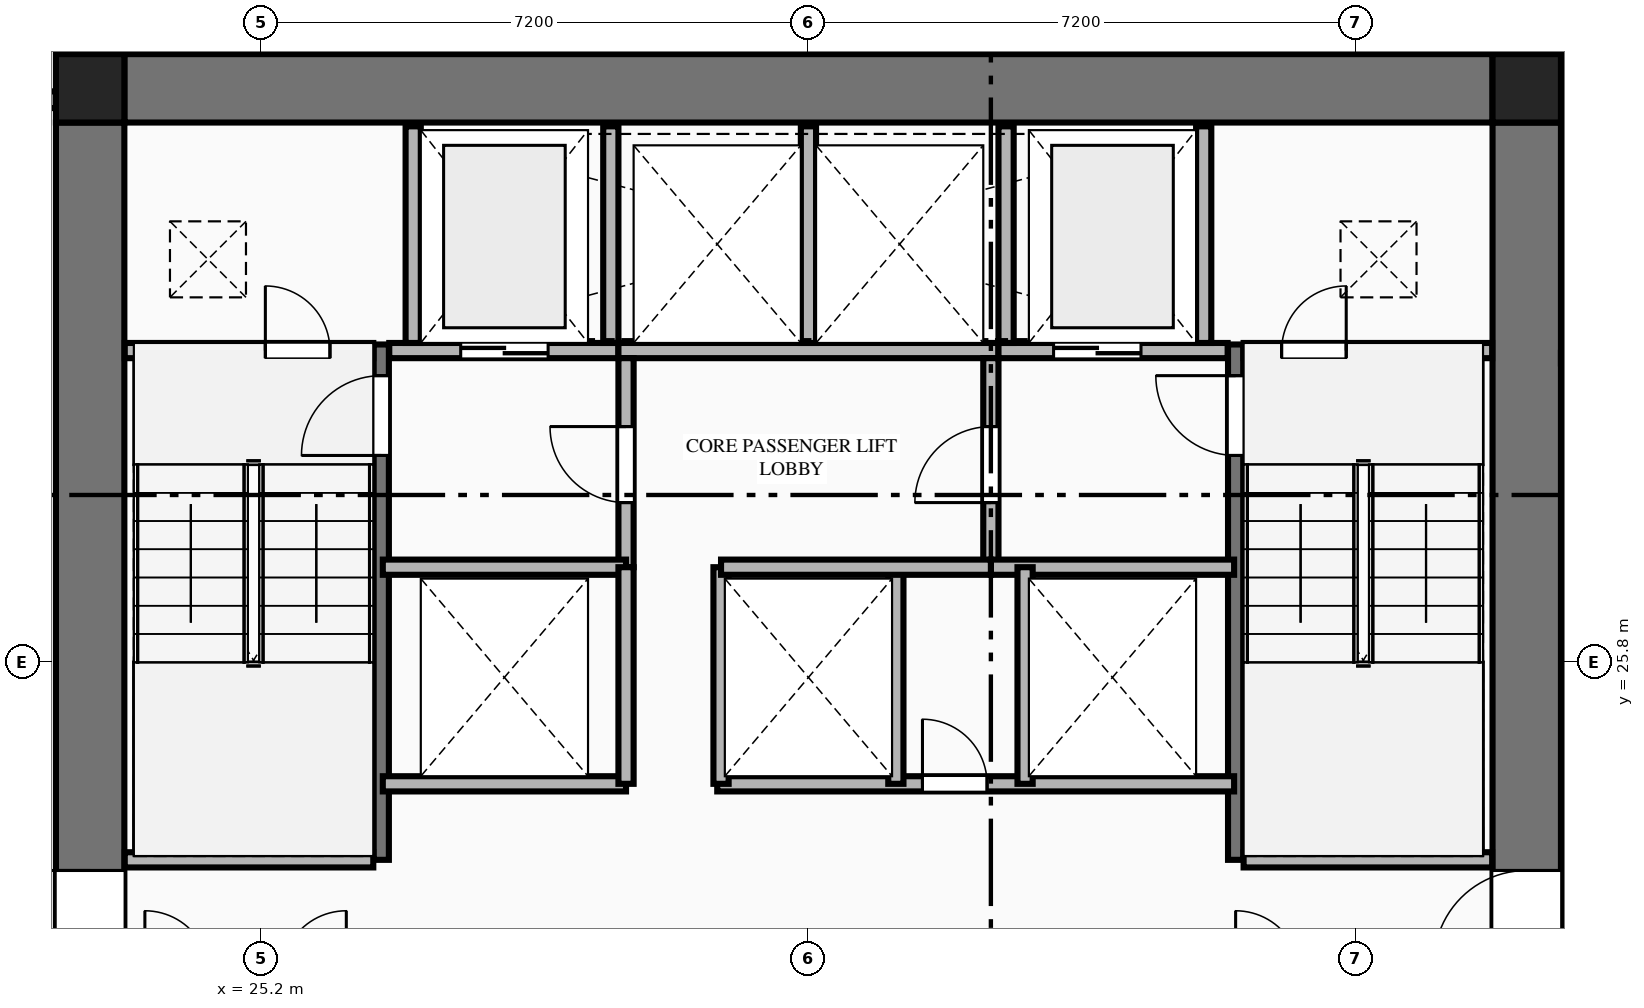
"""IFC4 building model, lengths in metres.
Left out: names, types, materials, properties, quantities, classifications, styles, units other than length and angle.
Written with IfcOpenShell. Run it as: python <this file> out.ifc"""

import sys

from ifc_helpers import new_model, si_unit, direction, frame, frame_2d, origin, origin_2d, place, context, subcontext, project, spatial, rectangle, extrude, element, fill, save


model = new_model("IFC4")
c1 = context("Model", 3, precision=1e-05, world=origin(), true_north=direction((0.0, 1.0)))
c2 = subcontext(c1, "Body", "Model", "MODEL_VIEW")
j1 = project(units=[si_unit("LENGTHUNIT", "METRE"), si_unit("PLANEANGLEUNIT", "RADIAN")], contexts=[c1])
p1 = place(None, origin())
s1 = spatial("IfcSite", under=j1, at=p1, CompositionType="ELEMENT")
p2 = place(p1, origin())
s2 = spatial("IfcBuilding", under=s1, at=p2, CompositionType="ELEMENT")
p3 = place(p2, frame((0.0, 0.0, 19.5)))
s3 = spatial("IfcBuildingStorey", under=s2, at=p3, CompositionType="ELEMENT", Elevation=19.5)
for number, where, z_axis, x_axis in (
    (1, (41.85, 33.35, 0.0), (0.0, 0.0, 1.0), (1.0, 0.0, 0.0)),
    (2, (22.95, 33.35, 0.0), (0.0, 0.0, 1.0), (1.0, 0.0, 0.0)),
):
    element("IfcColumn", number, at=place(p3, frame(where, z_axis=z_axis, x_axis=x_axis)), inside=s3, PredefinedType="COLUMN", context=c2, shape_type="SweptSolid", body=[
        extrude(rectangle(XDim=0.9, YDim=0.9, at=origin_2d()), origin(), (0.0, 0.0, 1.0), 5.4),
    ])
p4 = place(p3, frame((23.4, 33.35, 0.0), z_axis=(0.0, 0.0, 1.0), x_axis=(1.0, 0.0, 0.0)))
e3 = element("IfcWall", 3, at=p4, inside=s3, PredefinedType="SHEAR", context=c2, shape_type="SweptSolid", body=[
    extrude(rectangle(XDim=18.0, YDim=0.9, at=frame_2d((9.0, 0.0))), origin(), (0.0, 0.0, 1.0), 5.18),
])
p5 = place(p3, frame((22.95, 18.9, 0.0), z_axis=(0.0, 0.0, 1.0), x_axis=(0.0, 1.0, 0.0)))
e4 = element("IfcWall", 4, at=p5, inside=s3, PredefinedType="SHEAR", context=c2, shape_type="SweptSolid", body=[
    extrude(rectangle(XDim=14.0, YDim=0.9, at=frame_2d((7.0, 0.0))), origin(), (0.0, 0.0, 1.0), 5.18),
])
p6 = place(p5, frame((2.94, 0.0, 0.0)))
e5 = element("IfcOpeningElement", 5, at=p6, cuts=e4, PredefinedType="OPENING", context=c2, shape_type="SweptSolid", body=[
    extrude(rectangle(XDim=1.22, YDim=2.25, at=frame_2d((0.61, 1.125))), frame((0.0, 0.46, 0.0), z_axis=(0.0, -1.0, 0.0), x_axis=(1.0, 0.0, 0.0)), (0.0, 0.0, 1.0), 0.92),
])
p7 = place(p3, frame((41.85, 18.9, 0.0), z_axis=(0.0, 0.0, 1.0), x_axis=(0.0, 1.0, 0.0)))
e6 = element("IfcWall", 6, at=p7, inside=s3, PredefinedType="SHEAR", context=c2, shape_type="SweptSolid", body=[
    extrude(rectangle(XDim=14.0, YDim=0.9, at=frame_2d((7.0, 0.0))), origin(), (0.0, 0.0, 1.0), 5.18),
])
p8 = place(p7, frame((2.94, 0.0, 0.0)))
e7 = element("IfcOpeningElement", 7, at=p8, cuts=e6, PredefinedType="OPENING", context=c2, shape_type="SweptSolid", body=[
    extrude(rectangle(XDim=1.22, YDim=2.25, at=frame_2d((0.61, 1.125))), frame((0.0, 0.46, 0.0), z_axis=(0.0, -1.0, 0.0), x_axis=(1.0, 0.0, 0.0)), (0.0, 0.0, 1.0), 0.92),
])
p9 = place(p3, frame((26.78, 23.2, 0.0), z_axis=(0.0, 0.0, 1.0), x_axis=(0.0, 1.0, 0.0)))
e8 = element("IfcWall", 8, at=p9, inside=s3, PredefinedType="SHEAR", context=c2, shape_type="SweptSolid", body=[
    extrude(rectangle(XDim=6.78, YDim=0.2, at=frame_2d((3.39, 0.0))), origin(), (0.0, 0.0, 1.0), 5.4),
])
p10 = place(p9, frame((5.32, 0.0, 0.0)))
e9 = element("IfcOpeningElement", 9, at=p10, cuts=e8, PredefinedType="OPENING", context=c2, shape_type="SweptSolid", body=[
    extrude(rectangle(XDim=1.05, YDim=2.15, at=frame_2d((0.525, 1.075))), frame((0.0, 0.11, 0.0), z_axis=(0.0, -1.0, 0.0), x_axis=(1.0, 0.0, 0.0)), (0.0, 0.0, 1.0), 0.22),
])
p11 = place(p3, frame((23.405, 23.2, 0.0), z_axis=(0.0, 0.0, 1.0), x_axis=(1.0, 0.0, 0.0)))
e10 = element("IfcWall", 10, at=p11, inside=s3, PredefinedType="PLUMBINGWALL", context=c2, shape_type="SweptSolid", body=[
    extrude(rectangle(XDim=3.27, YDim=0.2, at=frame_2d((1.635, 0.0))), origin(), (0.0, 0.0, 1.0), 5.18),
])
p12 = place(p3, frame((38.02, 23.2, 0.0), z_axis=(0.0, 0.0, 1.0), x_axis=(0.0, 1.0, 0.0)))
e11 = element("IfcWall", 11, at=p12, inside=s3, PredefinedType="SHEAR", context=c2, shape_type="SweptSolid", body=[
    extrude(rectangle(XDim=6.78, YDim=0.2, at=frame_2d((3.39, 0.0))), origin(), (0.0, 0.0, 1.0), 5.4),
])
p13 = place(p12, frame((5.32, 0.0, 0.0)))
e12 = element("IfcOpeningElement", 12, at=p13, cuts=e11, PredefinedType="OPENING", context=c2, shape_type="SweptSolid", body=[
    extrude(rectangle(XDim=1.05, YDim=2.15, at=frame_2d((0.525, 1.075))), frame((0.0, 0.11, 0.0), z_axis=(0.0, -1.0, 0.0), x_axis=(1.0, 0.0, 0.0)), (0.0, 0.0, 1.0), 0.22),
])
p14 = place(p3, frame((38.125, 23.2, 0.0), z_axis=(0.0, 0.0, 1.0), x_axis=(1.0, 0.0, 0.0)))
e13 = element("IfcWall", 13, at=p14, inside=s3, PredefinedType="PLUMBINGWALL", context=c2, shape_type="SweptSolid", body=[
    extrude(rectangle(XDim=3.27, YDim=0.2, at=frame_2d((1.635, 0.0))), origin(), (0.0, 0.0, 1.0), 5.18),
])
p15 = place(p3, frame((23.405, 29.9, 0.0), z_axis=(0.0, 0.0, 1.0), x_axis=(1.0, 0.0, 0.0)))
e14 = element("IfcWall", 14, at=p15, inside=s3, PredefinedType="PLUMBINGWALL", context=c2, shape_type="SweptSolid", body=[
    extrude(rectangle(XDim=3.27, YDim=0.2, at=frame_2d((1.635, 0.0))), origin(), (0.0, 0.0, 1.0), 5.18),
])
p16 = place(p15, frame((1.85, 0.0, 0.0)))
e15 = element("IfcOpeningElement", 15, at=p16, cuts=e14, PredefinedType="OPENING", context=c2, shape_type="SweptSolid", body=[
    extrude(rectangle(XDim=0.85, YDim=2.05, at=frame_2d((0.425, 1.025))), frame((0.0, 0.11, 0.0), z_axis=(0.0, -1.0, 0.0), x_axis=(1.0, 0.0, 0.0)), (0.0, 0.0, 1.0), 0.22),
])
p17 = place(p3, frame((26.885, 29.9, 0.0), z_axis=(0.0, 0.0, 1.0), x_axis=(1.0, 0.0, 0.0)))
e16 = element("IfcWall", 16, at=p17, inside=s3, PredefinedType="PLUMBINGWALL", context=c2, shape_type="SweptSolid", body=[
    extrude(rectangle(XDim=3.015, YDim=0.2, at=frame_2d((1.507, 0.0))), origin(), (0.0, 0.0, 1.0), 5.18),
])
p18 = place(p17, frame((0.94, 0.0, 0.0)))
e17 = element("IfcOpeningElement", 17, at=p18, cuts=e16, PredefinedType="OPENING", context=c2, shape_type="SweptSolid", body=[
    extrude(rectangle(XDim=1.15, YDim=2.2, at=frame_2d((0.575, 1.1))), frame((0.0, 0.11, 0.0), z_axis=(0.0, -1.0, 0.0), x_axis=(1.0, 0.0, 0.0)), (0.0, 0.0, 1.0), 0.22),
])
p19 = place(p3, frame((29.9, 29.9, 0.0), z_axis=(0.0, 0.0, 1.0), x_axis=(1.0, 0.0, 0.0)))
e18 = element("IfcWall", 18, at=p19, inside=s3, PredefinedType="PLUMBINGWALL", context=c2, shape_type="SweptSolid", body=[
    extrude(rectangle(XDim=5.0, YDim=0.2, at=frame_2d((2.5, 0.0))), origin(), (0.0, 0.0, 1.0), 5.18),
])
p20 = place(p3, frame((34.9, 29.9, 0.0), z_axis=(0.0, 0.0, 1.0), x_axis=(1.0, 0.0, 0.0)))
e19 = element("IfcWall", 19, at=p20, inside=s3, PredefinedType="PLUMBINGWALL", context=c2, shape_type="SweptSolid", body=[
    extrude(rectangle(XDim=3.015, YDim=0.2, at=frame_2d((1.508, 0.0))), origin(), (0.0, 0.0, 1.0), 5.18),
])
p21 = place(p20, frame((0.725, 0.0, 0.0)))
e20 = element("IfcOpeningElement", 20, at=p21, cuts=e19, PredefinedType="OPENING", context=c2, shape_type="SweptSolid", body=[
    extrude(rectangle(XDim=1.15, YDim=2.2, at=frame_2d((0.575, 1.1))), frame((0.0, 0.11, 0.0), z_axis=(0.0, -1.0, 0.0), x_axis=(1.0, 0.0, 0.0)), (0.0, 0.0, 1.0), 0.22),
])
p22 = place(p3, frame((38.125, 29.9, 0.0), z_axis=(0.0, 0.0, 1.0), x_axis=(1.0, 0.0, 0.0)))
e21 = element("IfcWall", 21, at=p22, inside=s3, PredefinedType="PLUMBINGWALL", context=c2, shape_type="SweptSolid", body=[
    extrude(rectangle(XDim=3.27, YDim=0.2, at=frame_2d((1.635, 0.0))), origin(), (0.0, 0.0, 1.0), 5.18),
])
p23 = place(p22, frame((0.5, 0.0, 0.0)))
e22 = element("IfcOpeningElement", 22, at=p23, cuts=e21, PredefinedType="OPENING", context=c2, shape_type="SweptSolid", body=[
    extrude(rectangle(XDim=0.85, YDim=2.05, at=frame_2d((0.425, 1.025))), frame((0.0, 0.11, 0.0), z_axis=(0.0, -1.0, 0.0), x_axis=(1.0, 0.0, 0.0)), (0.0, 0.0, 1.0), 0.22),
])
for number, where, z_axis, x_axis in (
    (23, (27.2, 30.0, 0.0), (0.0, 0.0, 1.0), (0.0, 1.0, 0.0)),
    (24, (29.8, 30.0, 0.0), (0.0, 0.0, 1.0), (0.0, 1.0, 0.0)),
    (25, (32.4, 30.0, 0.0), (0.0, 0.0, 1.0), (0.0, 1.0, 0.0)),
    (26, (35.0, 30.0, 0.0), (0.0, 0.0, 1.0), (0.0, 1.0, 0.0)),
    (27, (37.6, 30.0, 0.0), (0.0, 0.0, 1.0), (0.0, 1.0, 0.0)),
):
    element("IfcWall", number, at=place(p3, frame(where, z_axis=z_axis, x_axis=x_axis)), inside=s3, PredefinedType="PLUMBINGWALL", context=c2, shape_type="SweptSolid", body=[
        extrude(rectangle(XDim=2.85, YDim=0.2, at=frame_2d((1.425, 0.0))), origin(), (0.0, 0.0, 1.0), 5.18),
    ])
p24 = place(p3, frame((30.0, 27.05, 0.0), z_axis=(0.0, 0.0, 1.0), x_axis=(0.0, 1.0, 0.0)))
e28 = element("IfcWall", 28, at=p24, inside=s3, PredefinedType="PLUMBINGWALL", context=c2, shape_type="SweptSolid", body=[
    extrude(rectangle(XDim=2.75, YDim=0.2, at=frame_2d((1.375, 0.0))), origin(), (0.0, 0.0, 1.0), 5.18),
])
p25 = place(p24, frame((0.85, 0.0, 0.0)))
e29 = element("IfcOpeningElement", 29, at=p25, cuts=e28, PredefinedType="OPENING", context=c2, shape_type="SweptSolid", body=[
    extrude(rectangle(XDim=1.0, YDim=2.15, at=frame_2d((0.5, 1.075))), frame((0.0, 0.11, 0.0), z_axis=(0.0, -1.0, 0.0), x_axis=(1.0, 0.0, 0.0)), (0.0, 0.0, 1.0), 0.22),
])
p26 = place(p3, frame((26.8, 27.05, 0.0), z_axis=(0.0, 0.0, 1.0), x_axis=(1.0, 0.0, 0.0)))
e30 = element("IfcWall", 30, at=p26, inside=s3, PredefinedType="PLUMBINGWALL", context=c2, shape_type="SweptSolid", body=[
    extrude(rectangle(XDim=3.2, YDim=0.2, at=frame_2d((1.6, 0.0))), origin(), (0.0, 0.0, 1.0), 5.18),
])
p27 = place(p3, frame((34.8, 27.05, 0.0), z_axis=(0.0, 0.0, 1.0), x_axis=(0.0, 1.0, 0.0)))
e31 = element("IfcWall", 31, at=p27, inside=s3, PredefinedType="PLUMBINGWALL", context=c2, shape_type="SweptSolid", body=[
    extrude(rectangle(XDim=2.75, YDim=0.2, at=frame_2d((1.375, 0.0))), origin(), (0.0, 0.0, 1.0), 5.18),
])
p28 = place(p27, frame((0.85, 0.0, 0.0)))
e32 = element("IfcOpeningElement", 32, at=p28, cuts=e31, PredefinedType="OPENING", context=c2, shape_type="SweptSolid", body=[
    extrude(rectangle(XDim=1.0, YDim=2.15, at=frame_2d((0.5, 1.075))), frame((0.0, 0.11, 0.0), z_axis=(0.0, -1.0, 0.0), x_axis=(1.0, 0.0, 0.0)), (0.0, 0.0, 1.0), 0.22),
])
for number, where, z_axis, x_axis in (
    (33, (34.8, 27.05, 0.0), (0.0, 0.0, 1.0), (1.0, 0.0, 0.0)),
    (34, (26.8, 24.2, 0.0), (0.0, 0.0, 1.0), (1.0, 0.0, 0.0)),
):
    element("IfcWall", number, at=place(p3, frame(where, z_axis=z_axis, x_axis=x_axis)), inside=s3, PredefinedType="PLUMBINGWALL", context=c2, shape_type="SweptSolid", body=[
        extrude(rectangle(XDim=3.2, YDim=0.2, at=frame_2d((1.6, 0.0))), origin(), (0.0, 0.0, 1.0), 5.18),
    ])
p29 = place(p3, frame((30.0, 24.2, 0.0), z_axis=(0.0, 0.0, 1.0), x_axis=(0.0, 1.0, 0.0)))
e35 = element("IfcWall", 35, at=p29, inside=s3, PredefinedType="PLUMBINGWALL", context=c2, shape_type="SweptSolid", body=[
    extrude(rectangle(XDim=2.85, YDim=0.2, at=frame_2d((1.425, 0.0))), origin(), (0.0, 0.0, 1.0), 5.18),
])
p30 = place(p3, frame((31.2, 24.2, 0.0), z_axis=(0.0, 0.0, 1.0), x_axis=(1.0, 0.0, 0.0)))
e36 = element("IfcWall", 36, at=p30, inside=s3, PredefinedType="PLUMBINGWALL", context=c2, shape_type="SweptSolid", body=[
    extrude(rectangle(XDim=6.8, YDim=0.2, at=frame_2d((3.4, 0.0))), origin(), (0.0, 0.0, 1.0), 5.18),
])
p31 = place(p30, frame((2.7, 0.0, 0.0)))
e37 = element("IfcOpeningElement", 37, at=p31, cuts=e36, PredefinedType="OPENING", context=c2, shape_type="SweptSolid", body=[
    extrude(rectangle(XDim=0.85, YDim=2.05, at=frame_2d((0.425, 1.025))), frame((0.0, 0.11, 0.0), z_axis=(0.0, -1.0, 0.0), x_axis=(1.0, 0.0, 0.0)), (0.0, 0.0, 1.0), 0.22),
])
for number, where, z_axis, x_axis in (
    (38, (31.25, 24.2, 0.0), (0.0, 0.0, 1.0), (0.0, 1.0, 0.0)),
    (39, (33.55, 24.2, 0.0), (0.0, 0.0, 1.0), (0.0, 1.0, 0.0)),
    (40, (35.25, 24.2, 0.0), (0.0, 0.0, 1.0), (0.0, 1.0, 0.0)),
):
    element("IfcWall", number, at=place(p3, frame(where, z_axis=z_axis, x_axis=x_axis)), inside=s3, PredefinedType="PLUMBINGWALL", context=c2, shape_type="SweptSolid", body=[
        extrude(rectangle(XDim=2.85, YDim=0.2, at=frame_2d((1.425, 0.0))), origin(), (0.0, 0.0, 1.0), 5.18),
    ])
p32 = place(p3, frame((31.25, 27.05, 0.0), z_axis=(0.0, 0.0, 1.0), x_axis=(1.0, 0.0, 0.0)))
e41 = element("IfcWall", 41, at=p32, inside=s3, PredefinedType="PLUMBINGWALL", context=c2, shape_type="SweptSolid", body=[
    extrude(rectangle(XDim=3.55, YDim=0.2, at=frame_2d((1.775, 0.0))), origin(), (0.0, 0.0, 1.0), 5.18),
])
p33 = place(p3, frame((6.925, 33.2, 0.0), z_axis=(0.0, 0.0, 1.0), x_axis=(1.0, 0.0, 0.0)))
e42 = element("IfcWall", 42, at=p33, inside=s3, PredefinedType="PARTITIONING", context=c2, shape_type="SweptSolid", body=[
    extrude(rectangle(XDim=15.575, YDim=0.22, at=frame_2d((7.788, 0.0))), origin(), (0.0, 0.0, 1.0), 3.79),
])
p34 = place(p33, frame((13.925, 0.0, 0.0)))
e43 = element("IfcOpeningElement", 43, at=p34, cuts=e42, PredefinedType="OPENING", context=c2, shape_type="SweptSolid", body=[
    extrude(rectangle(XDim=1.0, YDim=2.15, at=frame_2d((0.5, 1.075))), frame((0.0, 0.12, 0.0), z_axis=(0.0, -1.0, 0.0), x_axis=(1.0, 0.0, 0.0)), (0.0, 0.0, 1.0), 0.24),
])
p35 = place(p3, frame((42.3, 33.2, 0.0), z_axis=(0.0, 0.0, 1.0), x_axis=(1.0, 0.0, 0.0)))
e44 = element("IfcWall", 44, at=p35, inside=s3, PredefinedType="PARTITIONING", context=c2, shape_type="SweptSolid", body=[
    extrude(rectangle(XDim=15.575, YDim=0.22, at=frame_2d((7.788, 0.0))), origin(), (0.0, 0.0, 1.0), 3.79),
])
p36 = place(p35, frame((3.55, 0.0, 0.0)))
e45 = element("IfcOpeningElement", 45, at=p36, cuts=e44, PredefinedType="OPENING", context=c2, shape_type="SweptSolid", body=[
    extrude(rectangle(XDim=1.0, YDim=2.15, at=frame_2d((0.5, 1.075))), frame((0.0, 0.12, 0.0), z_axis=(0.0, -1.0, 0.0), x_axis=(1.0, 0.0, 0.0)), (0.0, 0.0, 1.0), 0.24),
])
p37 = place(p3, frame((42.3, 29.8, 0.0), z_axis=(0.0, 0.0, 1.0), x_axis=(1.0, 0.0, 0.0)))
e46 = element("IfcWall", 46, at=p37, inside=s3, PredefinedType="PLUMBINGWALL", context=c2, shape_type="SweptSolid", body=[
    extrude(rectangle(XDim=3.2, YDim=0.14, at=frame_2d((1.6, 0.0))), origin(), (0.0, 0.0, 1.0), 5.18),
])
p38 = place(p37, frame((0.8, 0.0, 0.0)))
e47 = element("IfcOpeningElement", 47, at=p38, cuts=e46, PredefinedType="OPENING", context=c2, shape_type="SweptSolid", body=[
    extrude(rectangle(XDim=0.96, YDim=2.15, at=frame_2d((0.48, 1.075))), frame((0.0, 0.08, 0.0), z_axis=(0.0, -1.0, 0.0), x_axis=(1.0, 0.0, 0.0)), (0.0, 0.0, 1.0), 0.16),
])
p39 = place(p6, origin())
e48 = element("IfcDoor", 48, at=p39, inside=s3, OperationType="SINGLE_SWING_RIGHT", PredefinedType="DOOR", context=c2, shape_type="SweptSolid", body=[
    extrude(rectangle(XDim=1.22, YDim=2.25, at=frame_2d((0.61, 1.125))), frame((0.0, 0.025, 0.0), z_axis=(0.0, -1.0, 0.0), x_axis=(1.0, 0.0, 0.0)), (0.0, 0.0, 1.0), 0.05),
])
fill(e5, e48)
p40 = place(p8, origin())
e49 = element("IfcDoor", 49, at=p40, inside=s3, OperationType="SINGLE_SWING_LEFT", PredefinedType="DOOR", context=c2, shape_type="SweptSolid", body=[
    extrude(rectangle(XDim=1.22, YDim=2.25, at=frame_2d((0.61, 1.125))), frame((0.0, 0.025, 0.0), z_axis=(0.0, -1.0, 0.0), x_axis=(1.0, 0.0, 0.0)), (0.0, 0.0, 1.0), 0.05),
])
fill(e7, e49)
p41 = place(p10, origin())
e50 = element("IfcDoor", 50, at=p41, inside=s3, OperationType="SINGLE_SWING_LEFT", PredefinedType="DOOR", context=c2, shape_type="SweptSolid", body=[
    extrude(rectangle(XDim=1.05, YDim=2.15, at=frame_2d((0.525, 1.075))), frame((0.0, 0.025, 0.0), z_axis=(0.0, -1.0, 0.0), x_axis=(1.0, 0.0, 0.0)), (0.0, 0.0, 1.0), 0.05),
])
fill(e9, e50)
p42 = place(p13, origin())
e51 = element("IfcDoor", 51, at=p42, inside=s3, OperationType="SINGLE_SWING_RIGHT", PredefinedType="DOOR", context=c2, shape_type="SweptSolid", body=[
    extrude(rectangle(XDim=1.05, YDim=2.15, at=frame_2d((0.525, 1.075))), frame((0.0, 0.025, 0.0), z_axis=(0.0, -1.0, 0.0), x_axis=(1.0, 0.0, 0.0)), (0.0, 0.0, 1.0), 0.05),
])
fill(e12, e51)
p43 = place(p16, origin())
e52 = element("IfcDoor", 52, at=p43, inside=s3, OperationType="SINGLE_SWING_LEFT", PredefinedType="DOOR", context=c2, shape_type="SweptSolid", body=[
    extrude(rectangle(XDim=0.85, YDim=2.05, at=frame_2d((0.425, 1.025))), frame((0.0, 0.025, 0.0), z_axis=(0.0, -1.0, 0.0), x_axis=(1.0, 0.0, 0.0)), (0.0, 0.0, 1.0), 0.05),
])
fill(e15, e52)
p44 = place(p23, origin())
e53 = element("IfcDoor", 53, at=p44, inside=s3, OperationType="SINGLE_SWING_RIGHT", PredefinedType="DOOR", context=c2, shape_type="SweptSolid", body=[
    extrude(rectangle(XDim=0.85, YDim=2.05, at=frame_2d((0.425, 1.025))), frame((0.0, 0.025, 0.0), z_axis=(0.0, -1.0, 0.0), x_axis=(1.0, 0.0, 0.0)), (0.0, 0.0, 1.0), 0.05),
])
fill(e22, e53)
p45 = place(p18, origin())
e54 = element("IfcDoor", 54, at=p45, inside=s3, OperationType="DOUBLE_DOOR_SLIDING", PredefinedType="DOOR", context=c2, shape_type="SweptSolid", body=[
    extrude(rectangle(XDim=1.15, YDim=2.2, at=frame_2d((0.575, 1.1))), frame((0.0, 0.025, 0.0), z_axis=(0.0, -1.0, 0.0), x_axis=(1.0, 0.0, 0.0)), (0.0, 0.0, 1.0), 0.05),
])
fill(e17, e54)
p46 = place(p21, origin())
e55 = element("IfcDoor", 55, at=p46, inside=s3, OperationType="DOUBLE_DOOR_SLIDING", PredefinedType="DOOR", context=c2, shape_type="SweptSolid", body=[
    extrude(rectangle(XDim=1.15, YDim=2.2, at=frame_2d((0.575, 1.1))), frame((0.0, 0.025, 0.0), z_axis=(0.0, -1.0, 0.0), x_axis=(1.0, 0.0, 0.0)), (0.0, 0.0, 1.0), 0.05),
])
fill(e20, e55)
p47 = place(p25, origin())
e56 = element("IfcDoor", 56, at=p47, inside=s3, OperationType="SINGLE_SWING_RIGHT", PredefinedType="DOOR", context=c2, shape_type="SweptSolid", body=[
    extrude(rectangle(XDim=1.0, YDim=2.15, at=frame_2d((0.5, 1.075))), frame((0.0, 0.025, 0.0), z_axis=(0.0, -1.0, 0.0), x_axis=(1.0, 0.0, 0.0)), (0.0, 0.0, 1.0), 0.05),
])
fill(e29, e56)
p48 = place(p28, origin())
e57 = element("IfcDoor", 57, at=p48, inside=s3, OperationType="SINGLE_SWING_LEFT", PredefinedType="DOOR", context=c2, shape_type="SweptSolid", body=[
    extrude(rectangle(XDim=1.0, YDim=2.15, at=frame_2d((0.5, 1.075))), frame((0.0, 0.025, 0.0), z_axis=(0.0, -1.0, 0.0), x_axis=(1.0, 0.0, 0.0)), (0.0, 0.0, 1.0), 0.05),
])
fill(e32, e57)
p49 = place(p31, origin())
e58 = element("IfcDoor", 58, at=p49, inside=s3, OperationType="SINGLE_SWING_LEFT", PredefinedType="DOOR", context=c2, shape_type="SweptSolid", body=[
    extrude(rectangle(XDim=0.85, YDim=2.05, at=frame_2d((0.425, 1.025))), frame((0.0, 0.025, 0.0), z_axis=(0.0, -1.0, 0.0), x_axis=(1.0, 0.0, 0.0)), (0.0, 0.0, 1.0), 0.05),
])
fill(e37, e58)
save(model, sys.argv[1])
